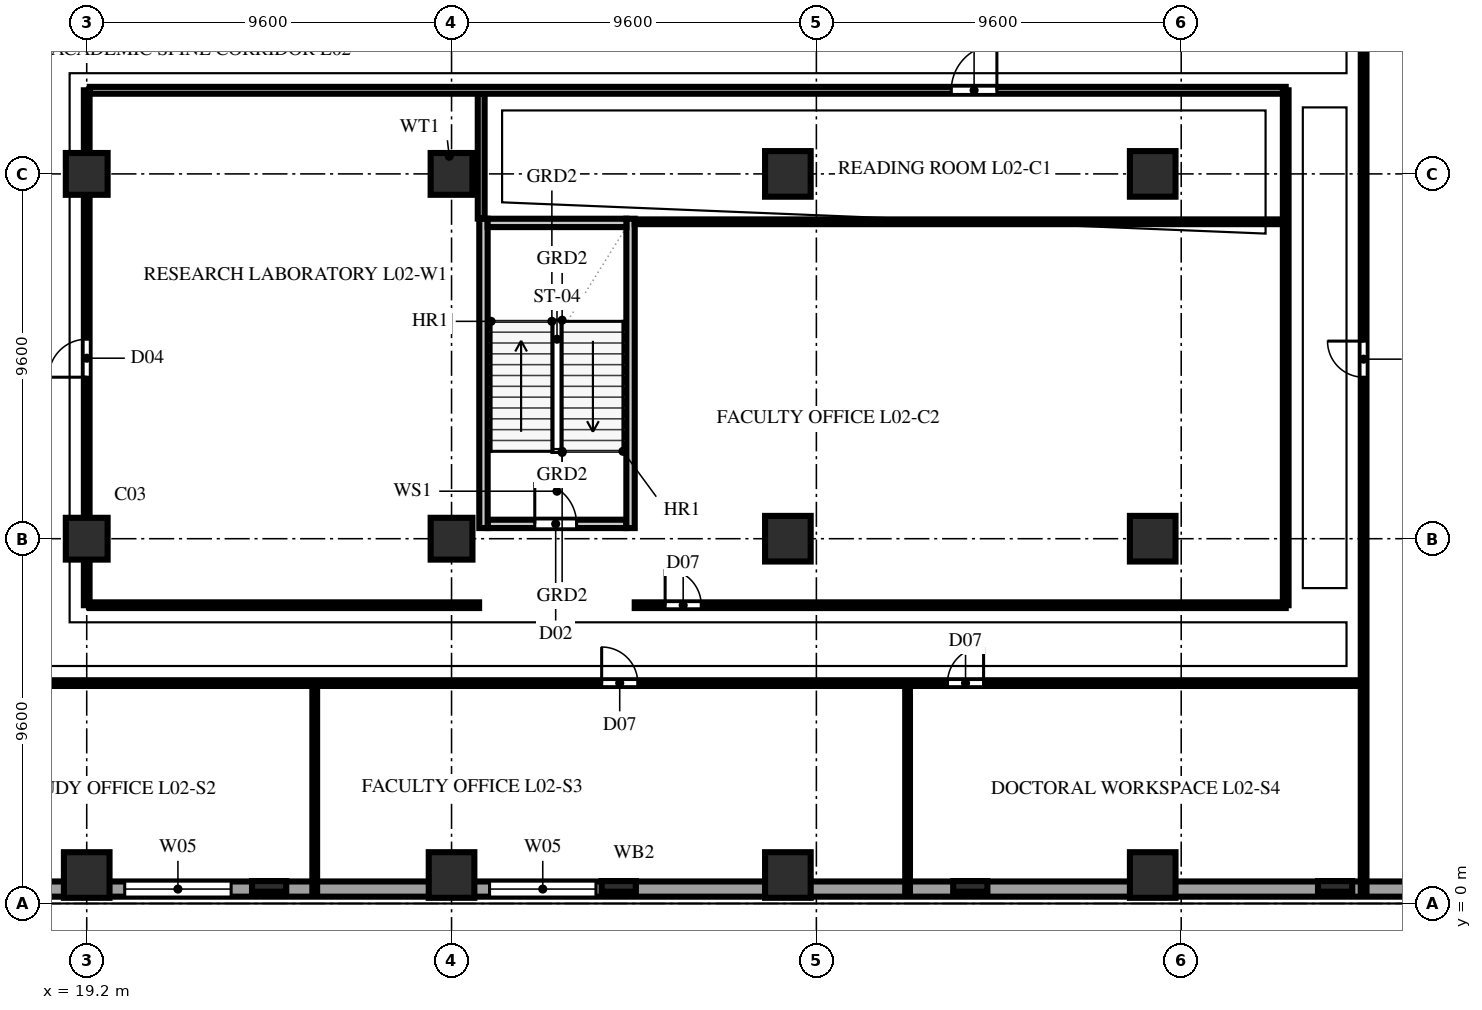
"""IFC4 building model, lengths in metres.
Left out: names, types, materials, properties, quantities, classifications, styles, units other than length and angle.
Written with IfcOpenShell. Run it as: python <this file> out.ifc"""

import sys

from ifc_helpers import new_model, si_unit, direction, frame, frame_2d, origin, origin_2d, place, context, subcontext, project, spatial, rectangle, extrude, element, fill, save


model = new_model("IFC4")
c1 = context("Model", 3, precision=1e-05, world=origin(), true_north=direction((0.0, 1.0)))
c2 = subcontext(c1, "Body", "Model", "MODEL_VIEW")
j1 = project(units=[si_unit("LENGTHUNIT", "METRE"), si_unit("PLANEANGLEUNIT", "RADIAN")], contexts=[c1])
p1 = place(None, origin())
s1 = spatial("IfcSite", under=j1, at=p1, CompositionType="ELEMENT")
p2 = place(p1, origin())
s2 = spatial("IfcBuilding", under=s1, at=p2, CompositionType="ELEMENT")
p3 = place(p2, frame((0.0, 0.0, 10.4)))
s3 = spatial("IfcBuildingStorey", under=s2, at=p3, CompositionType="ELEMENT", Elevation=10.4)
p4 = place(p3, frame((19.2, 0.75, 0.0), z_axis=(0.0, 0.0, 1.0), x_axis=(1.0, 0.0, 0.0)))
e1 = element("IfcColumn", 1, at=p4, inside=s3, PredefinedType="COLUMN", context=c2, shape_type="SweptSolid", body=[
    extrude(rectangle(XDim=1.2, YDim=1.2, at=origin_2d()), origin(), (0.0, 0.0, 1.0), 4.6),
])
for number, where, z_axis, x_axis in (
    (2, (19.2, 9.6, 0.0), (0.0, 0.0, 1.0), (1.0, 0.0, 0.0)),
    (3, (19.2, 19.2, 0.0), (0.0, 0.0, 1.0), (1.0, 0.0, 0.0)),
):
    element("IfcColumn", number, at=place(p3, frame(where, z_axis=z_axis, x_axis=x_axis)), inside=s3, PredefinedType="COLUMN", context=c2, shape_type="SweptSolid", body=[
        extrude(rectangle(XDim=1.1, YDim=1.1, at=origin_2d()), origin(), (0.0, 0.0, 1.0), 4.6),
    ])
p5 = place(p3, frame((28.8, 0.75, 0.0), z_axis=(0.0, 0.0, 1.0), x_axis=(1.0, 0.0, 0.0)))
e4 = element("IfcColumn", 4, at=p5, inside=s3, PredefinedType="COLUMN", context=c2, shape_type="SweptSolid", body=[
    extrude(rectangle(XDim=1.2, YDim=1.2, at=origin_2d()), origin(), (0.0, 0.0, 1.0), 4.6),
])
for number, where, z_axis, x_axis in (
    (5, (28.8, 9.6, 0.0), (0.0, 0.0, 1.0), (1.0, 0.0, 0.0)),
    (6, (28.8, 19.2, 0.0), (0.0, 0.0, 1.0), (1.0, 0.0, 0.0)),
):
    element("IfcColumn", number, at=place(p3, frame(where, z_axis=z_axis, x_axis=x_axis)), inside=s3, PredefinedType="COLUMN", context=c2, shape_type="SweptSolid", body=[
        extrude(rectangle(XDim=1.1, YDim=1.1, at=origin_2d()), origin(), (0.0, 0.0, 1.0), 4.6),
    ])
for number, where, z_axis, x_axis in (
    (7, (37.65, 0.75, 0.0), (0.0, 0.0, 1.0), (1.0, 0.0, 0.0)),
    (8, (37.65, 9.6, 0.0), (0.0, 0.0, 1.0), (1.0, 0.0, 0.0)),
    (9, (37.65, 19.2, 0.0), (0.0, 0.0, 1.0), (1.0, 0.0, 0.0)),
    (10, (47.25, 0.75, 0.0), (0.0, 0.0, 1.0), (1.0, 0.0, 0.0)),
    (11, (47.25, 9.6, 0.0), (0.0, 0.0, 1.0), (1.0, 0.0, 0.0)),
    (12, (47.25, 19.2, 0.0), (0.0, 0.0, 1.0), (1.0, 0.0, 0.0)),
):
    element("IfcColumn", number, at=place(p3, frame(where, z_axis=z_axis, x_axis=x_axis)), inside=s3, PredefinedType="COLUMN", context=c2, shape_type="SweptSolid", body=[
        extrude(rectangle(XDim=1.2, YDim=1.2, at=origin_2d()), origin(), (0.0, 0.0, 1.0), 4.6),
    ])
for number, where, z_axis, x_axis in (
    (13, (24.0, 0.45, 0.0), (0.0, 0.0, 1.0), (1.0, 0.0, 0.0)),
    (14, (33.2, 0.45, 0.0), (0.0, 0.0, 1.0), (1.0, 0.0, 0.0)),
    (15, (42.45, 0.45, 0.0), (0.0, 0.0, 1.0), (1.0, 0.0, 0.0)),
    (16, (52.05, 0.45, 0.0), (0.0, 0.0, 1.0), (1.0, 0.0, 0.0)),
):
    element("IfcColumn", number, at=place(p3, frame(where, z_axis=z_axis, x_axis=x_axis)), inside=s3, PredefinedType="PILASTER", context=c2, shape_type="SweptSolid", body=[
        extrude(rectangle(XDim=0.9, YDim=0.28, at=origin_2d()), origin(), (0.0, 0.0, 1.0), 4.6),
    ])
p6 = place(p3, frame((1.84, 0.38, 0.0), z_axis=(0.0, 0.0, 1.0), x_axis=(1.0, 0.0, 0.0)))
e17 = element("IfcWall", 17, at=p6, inside=s3, PredefinedType="SOLIDWALL", context=c2, shape_type="SweptSolid", body=[
    extrude(rectangle(XDim=63.52, YDim=0.4, at=frame_2d((31.76, 0.0))), origin(), (0.0, 0.0, 1.0), 4.26),
])
p7 = place(p6, frame((3.96, 0.0, 0.75)))
e18 = element("IfcOpeningElement", 18, at=p7, cuts=e17, PredefinedType="OPENING", context=c2, shape_type="SweptSolid", body=[
    extrude(rectangle(XDim=2.8, YDim=2.3, at=frame_2d((1.4, 1.15))), frame((0.0, 0.212, 0.0), z_axis=(0.0, -1.0, 0.0), x_axis=(1.0, 0.0, 0.0)), (0.0, 0.0, 1.0), 0.424),
])
p8 = place(p6, frame((13.56, 0.0, 0.75)))
e19 = element("IfcOpeningElement", 19, at=p8, cuts=e17, PredefinedType="OPENING", context=c2, shape_type="SweptSolid", body=[
    extrude(rectangle(XDim=2.8, YDim=2.3, at=frame_2d((1.4, 1.15))), frame((0.0, 0.212, 0.0), z_axis=(0.0, -1.0, 0.0), x_axis=(1.0, 0.0, 0.0)), (0.0, 0.0, 1.0), 0.424),
])
p9 = place(p6, frame((18.36, 0.0, 0.75)))
e20 = element("IfcOpeningElement", 20, at=p9, cuts=e17, PredefinedType="OPENING", context=c2, shape_type="SweptSolid", body=[
    extrude(rectangle(XDim=2.8, YDim=2.3, at=frame_2d((1.4, 1.15))), frame((0.0, 0.212, 0.0), z_axis=(0.0, -1.0, 0.0), x_axis=(1.0, 0.0, 0.0)), (0.0, 0.0, 1.0), 0.424),
])
p10 = place(p6, frame((27.96, 0.0, 0.75)))
e21 = element("IfcOpeningElement", 21, at=p10, cuts=e17, PredefinedType="OPENING", context=c2, shape_type="SweptSolid", body=[
    extrude(rectangle(XDim=2.8, YDim=2.3, at=frame_2d((1.4, 1.15))), frame((0.0, 0.212, 0.0), z_axis=(0.0, -1.0, 0.0), x_axis=(1.0, 0.0, 0.0)), (0.0, 0.0, 1.0), 0.424),
])
p11 = place(p3, frame((29.75, 9.99, 0.0), z_axis=(0.0, 0.0, 1.0), x_axis=(1.0, 0.0, 0.0)))
e22 = element("IfcWall", 22, at=p11, inside=s3, PredefinedType="SOLIDWALL", context=c2, shape_type="SweptSolid", body=[
    extrude(rectangle(XDim=3.65, YDim=0.22, at=frame_2d((1.825, 0.0))), origin(), (0.0, 0.0, 1.0), 4.26),
])
p12 = place(p11, frame((1.24, 0.0, 0.0)))
e23 = element("IfcOpeningElement", 23, at=p12, cuts=e22, PredefinedType="OPENING", context=c2, shape_type="SweptSolid", body=[
    extrude(rectangle(XDim=1.1, YDim=2.2, at=frame_2d((0.55, 1.1))), frame((0.0, 0.122, 0.0), z_axis=(0.0, -1.0, 0.0), x_axis=(1.0, 0.0, 0.0)), (0.0, 0.0, 1.0), 0.244),
])
for number, where, z_axis, x_axis in (
    (24, (29.64, 9.88, 0.0), (0.0, 0.0, 1.0), (0.0, 1.0, 0.0)),
    (25, (33.51, 9.88, 0.0), (0.0, 0.0, 1.0), (0.0, 1.0, 0.0)),
):
    element("IfcWall", number, at=place(p3, frame(where, z_axis=z_axis, x_axis=x_axis)), inside=s3, PredefinedType="SOLIDWALL", context=c2, shape_type="SweptSolid", body=[
        extrude(rectangle(XDim=8.14, YDim=0.22, at=frame_2d((4.07, 0.0))), origin(), (0.0, 0.0, 1.0), 4.26),
    ])
p13 = place(p3, frame((29.75, 17.91, 0.0), z_axis=(0.0, 0.0, 1.0), x_axis=(1.0, 0.0, 0.0)))
e26 = element("IfcWall", 26, at=p13, inside=s3, PredefinedType="SOLIDWALL", context=c2, shape_type="SweptSolid", body=[
    extrude(rectangle(XDim=3.65, YDim=0.22, at=frame_2d((1.825, 0.0))), origin(), (0.0, 0.0, 1.0), 4.26),
])
for number, where, z_axis, x_axis in (
    (27, (25.2, 0.22, 0.0), (0.0, 0.0, 1.0), (0.0, 1.0, 0.0)),
    (28, (40.8, 0.22, 0.0), (0.0, 0.0, 1.0), (0.0, 1.0, 0.0)),
):
    element("IfcWall", number, at=place(p3, frame(where, z_axis=z_axis, x_axis=x_axis)), inside=s3, PredefinedType="PARTITIONING", context=c2, shape_type="SweptSolid", body=[
        extrude(rectangle(XDim=5.58, YDim=0.125, at=frame_2d((2.79, 0.0))), origin(), (0.0, 0.0, 1.0), 4.26),
    ])
p14 = place(p3, frame((0.22, 5.8, 0.0), z_axis=(0.0, 0.0, 1.0), x_axis=(1.0, 0.0, 0.0)))
e29 = element("IfcWall", 29, at=p14, inside=s3, PredefinedType="PARTITIONING", context=c2, shape_type="SweptSolid", body=[
    extrude(rectangle(XDim=52.58, YDim=0.15, at=frame_2d((26.29, 0.0))), origin(), (0.0, 0.0, 1.0), 4.26),
])
p15 = place(p14, frame((10.18, 0.0, 0.0)))
e30 = element("IfcOpeningElement", 30, at=p15, cuts=e29, PredefinedType="OPENING", context=c2, shape_type="SweptSolid", body=[
    extrude(rectangle(XDim=0.95, YDim=2.15, at=frame_2d((0.475, 1.075))), frame((0.0, 0.087, 0.0), z_axis=(0.0, -1.0, 0.0), x_axis=(1.0, 0.0, 0.0)), (0.0, 0.0, 1.0), 0.174),
])
p16 = place(p14, frame((13.58, 0.0, 0.0)))
e31 = element("IfcOpeningElement", 31, at=p16, cuts=e29, PredefinedType="OPENING", context=c2, shape_type="SweptSolid", body=[
    extrude(rectangle(XDim=0.95, YDim=2.15, at=frame_2d((0.475, 1.075))), frame((0.0, 0.087, 0.0), z_axis=(0.0, -1.0, 0.0), x_axis=(1.0, 0.0, 0.0)), (0.0, 0.0, 1.0), 0.174),
])
p17 = place(p14, frame((32.53, 0.0, 0.0)))
e32 = element("IfcOpeningElement", 32, at=p17, cuts=e29, PredefinedType="OPENING", context=c2, shape_type="SweptSolid", body=[
    extrude(rectangle(XDim=0.95, YDim=2.15, at=frame_2d((0.475, 1.075))), frame((0.0, 0.087, 0.0), z_axis=(0.0, -1.0, 0.0), x_axis=(1.0, 0.0, 0.0)), (0.0, 0.0, 1.0), 0.174),
])
p18 = place(p14, frame((41.63, 0.0, 0.0)))
e33 = element("IfcOpeningElement", 33, at=p18, cuts=e29, PredefinedType="OPENING", context=c2, shape_type="SweptSolid", body=[
    extrude(rectangle(XDim=0.95, YDim=2.15, at=frame_2d((0.475, 1.075))), frame((0.0, 0.087, 0.0), z_axis=(0.0, -1.0, 0.0), x_axis=(1.0, 0.0, 0.0)), (0.0, 0.0, 1.0), 0.174),
])
p19 = place(p3, frame((52.8, 0.22, 0.0), z_axis=(0.0, 0.0, 1.0), x_axis=(0.0, 1.0, 0.0)))
e34 = element("IfcWall", 34, at=p19, inside=s3, PredefinedType="PARTITIONING", context=c2, shape_type="SweptSolid", body=[
    extrude(rectangle(XDim=37.96, YDim=0.15, at=frame_2d((18.98, 0.0))), origin(), (0.0, 0.0, 1.0), 4.26),
])
p20 = place(p19, frame((13.63, 0.0, 0.0)))
e35 = element("IfcOpeningElement", 35, at=p20, cuts=e34, PredefinedType="OPENING", context=c2, shape_type="SweptSolid", body=[
    extrude(rectangle(XDim=0.95, YDim=2.15, at=frame_2d((0.475, 1.075))), frame((0.0, 0.087, 0.0), z_axis=(0.0, -1.0, 0.0), x_axis=(1.0, 0.0, 0.0)), (0.0, 0.0, 1.0), 0.174),
])
p21 = place(p3, frame((19.2, 7.85, 0.0), z_axis=(0.0, 0.0, 1.0), x_axis=(0.0, 1.0, 0.0)))
e36 = element("IfcWall", 36, at=p21, inside=s3, PredefinedType="PARTITIONING", context=c2, shape_type="SweptSolid", body=[
    extrude(rectangle(XDim=13.55, YDim=0.15, at=frame_2d((6.775, 0.0))), origin(), (0.0, 0.0, 1.0), 3.644),
])
p22 = place(p21, frame((6.0, 0.0, 0.0)))
e37 = element("IfcOpeningElement", 37, at=p22, cuts=e36, PredefinedType="OPENING", context=c2, shape_type="SweptSolid", body=[
    extrude(rectangle(XDim=1.0, YDim=2.2, at=frame_2d((0.5, 1.1))), frame((0.0, 0.087, 0.0), z_axis=(0.0, -1.0, 0.0), x_axis=(1.0, 0.0, 0.0)), (0.0, 0.0, 1.0), 0.174),
])
p23 = place(p3, frame((29.58, 18.025, 0.0), z_axis=(0.0, 0.0, 1.0), x_axis=(0.0, 1.0, 0.0)))
e38 = element("IfcWall", 38, at=p23, inside=s3, PredefinedType="PARTITIONING", context=c2, shape_type="SweptSolid", body=[
    extrude(rectangle(XDim=3.28, YDim=0.18, at=frame_2d((1.64, 0.0))), origin(), (0.0, 0.0, 1.0), 4.26),
])
p24 = place(p3, frame((19.28, 21.4, 0.0), z_axis=(0.0, 0.0, 1.0), x_axis=(1.0, 0.0, 0.0)))
e39 = element("IfcWall", 39, at=p24, inside=s3, PredefinedType="PARTITIONING", context=c2, shape_type="SweptSolid", body=[
    extrude(rectangle(XDim=31.47, YDim=0.18, at=frame_2d((15.735, 0.0))), origin(), (0.0, 0.0, 1.0), 4.26),
])
p25 = place(p24, frame((22.67, 0.0, 0.0)))
e40 = element("IfcOpeningElement", 40, at=p25, cuts=e39, PredefinedType="OPENING", context=c2, shape_type="SweptSolid", body=[
    extrude(rectangle(XDim=1.2, YDim=2.2, at=frame_2d((0.6, 1.1))), frame((0.0, 0.102, 0.0), z_axis=(0.0, -1.0, 0.0), x_axis=(1.0, 0.0, 0.0)), (0.0, 0.0, 1.0), 0.204),
])
p26 = place(p3, frame((19.28, 7.85, 0.0), z_axis=(0.0, 0.0, 1.0), x_axis=(1.0, 0.0, 0.0)))
e41 = element("IfcWall", 41, at=p26, inside=s3, PredefinedType="PARTITIONING", context=c2, shape_type="SweptSolid", body=[
    extrude(rectangle(XDim=10.245, YDim=0.15, at=frame_2d((5.123, 0.0))), origin(), (0.0, 0.0, 1.0), 4.26),
])
p27 = place(p3, frame((33.62, 17.94, 0.0), z_axis=(0.0, 0.0, 1.0), x_axis=(1.0, 0.0, 0.0)))
e42 = element("IfcWall", 42, at=p27, inside=s3, PredefinedType="PARTITIONING", context=c2, shape_type="SweptSolid", body=[
    extrude(rectangle(XDim=17.13, YDim=0.125, at=frame_2d((8.565, 0.0))), origin(), (0.0, 0.0, 1.0), 4.26),
])
p28 = place(p3, frame((33.62, 7.85, 0.0), z_axis=(0.0, 0.0, 1.0), x_axis=(1.0, 0.0, 0.0)))
e43 = element("IfcWall", 43, at=p28, inside=s3, PredefinedType="PARTITIONING", context=c2, shape_type="SweptSolid", body=[
    extrude(rectangle(XDim=17.13, YDim=0.15, at=frame_2d((8.565, 0.0))), origin(), (0.0, 0.0, 1.0), 4.26),
])
p29 = place(p28, frame((0.8, 0.0, 0.0)))
e44 = element("IfcOpeningElement", 44, at=p29, cuts=e43, PredefinedType="OPENING", context=c2, shape_type="SweptSolid", body=[
    extrude(rectangle(XDim=0.95, YDim=2.15, at=frame_2d((0.475, 1.075))), frame((0.0, 0.087, 0.0), z_axis=(0.0, -1.0, 0.0), x_axis=(1.0, 0.0, 0.0)), (0.0, 0.0, 1.0), 0.174),
])
p30 = place(p3, frame((50.75, 7.85, 0.0), z_axis=(0.0, 0.0, 1.0), x_axis=(0.0, 1.0, 0.0)))
e45 = element("IfcWall", 45, at=p30, inside=s3, PredefinedType="PARTITIONING", context=c2, shape_type="SweptSolid", body=[
    extrude(rectangle(XDim=13.55, YDim=0.15, at=frame_2d((6.775, 0.0))), origin(), (0.0, 0.0, 1.0), 4.26),
])
p31 = place(p9, origin())
e46 = element("IfcWindow", 46, at=p31, inside=s3, PartitioningType="TRIPLE_PANEL_VERTICAL", PredefinedType="WINDOW", context=c2, shape_type="SweptSolid", body=[
    extrude(rectangle(XDim=2.8, YDim=2.3, at=frame_2d((1.4, 1.15))), frame((0.0, 0.11, 0.0), z_axis=(0.0, -1.0, 0.0), x_axis=(1.0, 0.0, 0.0)), (0.0, 0.0, 1.0), 0.06),
])
fill(e20, e46)
p32 = place(p10, origin())
e47 = element("IfcWindow", 47, at=p32, inside=s3, PartitioningType="TRIPLE_PANEL_VERTICAL", PredefinedType="WINDOW", context=c2, shape_type="SweptSolid", body=[
    extrude(rectangle(XDim=2.8, YDim=2.3, at=frame_2d((1.4, 1.15))), frame((0.0, 0.11, 0.0), z_axis=(0.0, -1.0, 0.0), x_axis=(1.0, 0.0, 0.0)), (0.0, 0.0, 1.0), 0.06),
])
fill(e21, e47)
p33 = place(p12, origin())
e48 = element("IfcDoor", 48, at=p33, inside=s3, OperationType="SINGLE_SWING_LEFT", PredefinedType="DOOR", context=c2, shape_type="SweptSolid", body=[
    extrude(rectangle(XDim=1.1, YDim=2.2, at=frame_2d((0.55, 1.1))), frame((0.0, 0.025, 0.0), z_axis=(0.0, -1.0, 0.0), x_axis=(1.0, 0.0, 0.0)), (0.0, 0.0, 1.0), 0.05),
])
fill(e23, e48)
p34 = place(p17, origin())
e49 = element("IfcDoor", 49, at=p34, inside=s3, OperationType="SINGLE_SWING_LEFT", PredefinedType="DOOR", context=c2, shape_type="SweptSolid", body=[
    extrude(rectangle(XDim=0.95, YDim=2.15, at=frame_2d((0.475, 1.075))), frame((0.0, 0.025, 0.0), z_axis=(0.0, -1.0, 0.0), x_axis=(1.0, 0.0, 0.0)), (0.0, 0.0, 1.0), 0.05),
])
fill(e32, e49)
p35 = place(p18, origin())
e50 = element("IfcDoor", 50, at=p35, inside=s3, OperationType="SINGLE_SWING_RIGHT", PredefinedType="DOOR", context=c2, shape_type="SweptSolid", body=[
    extrude(rectangle(XDim=0.95, YDim=2.15, at=frame_2d((0.475, 1.075))), frame((0.0, 0.025, 0.0), z_axis=(0.0, -1.0, 0.0), x_axis=(1.0, 0.0, 0.0)), (0.0, 0.0, 1.0), 0.05),
])
fill(e33, e50)
p36 = place(p20, origin())
e51 = element("IfcDoor", 51, at=p36, inside=s3, OperationType="SINGLE_SWING_RIGHT", PredefinedType="DOOR", context=c2, shape_type="SweptSolid", body=[
    extrude(rectangle(XDim=0.95, YDim=2.15, at=frame_2d((0.475, 1.075))), frame((0.0, 0.025, 0.0), z_axis=(0.0, -1.0, 0.0), x_axis=(1.0, 0.0, 0.0)), (0.0, 0.0, 1.0), 0.05),
])
fill(e35, e51)
p37 = place(p22, origin())
e52 = element("IfcDoor", 52, at=p37, inside=s3, OperationType="SINGLE_SWING_LEFT", PredefinedType="DOOR", context=c2, shape_type="SweptSolid", body=[
    extrude(rectangle(XDim=1.0, YDim=2.2, at=frame_2d((0.5, 1.1))), frame((0.0, 0.025, 0.0), z_axis=(0.0, -1.0, 0.0), x_axis=(1.0, 0.0, 0.0)), (0.0, 0.0, 1.0), 0.05),
])
fill(e37, e52)
p38 = place(p25, origin())
e53 = element("IfcDoor", 53, at=p38, inside=s3, OperationType="SINGLE_SWING_RIGHT", PredefinedType="DOOR", context=c2, shape_type="SweptSolid", body=[
    extrude(rectangle(XDim=1.2, YDim=2.2, at=frame_2d((0.6, 1.1))), frame((0.0, 0.025, 0.0), z_axis=(0.0, -1.0, 0.0), x_axis=(1.0, 0.0, 0.0)), (0.0, 0.0, 1.0), 0.05),
])
fill(e40, e53)
p39 = place(p29, origin())
e54 = element("IfcDoor", 54, at=p39, inside=s3, OperationType="SINGLE_SWING_LEFT", PredefinedType="DOOR", context=c2, shape_type="SweptSolid", body=[
    extrude(rectangle(XDim=0.95, YDim=2.15, at=frame_2d((0.475, 1.075))), frame((0.0, 0.025, 0.0), z_axis=(0.0, -1.0, 0.0), x_axis=(1.0, 0.0, 0.0)), (0.0, 0.0, 1.0), 0.05),
])
fill(e44, e54)
save(model, sys.argv[1])
